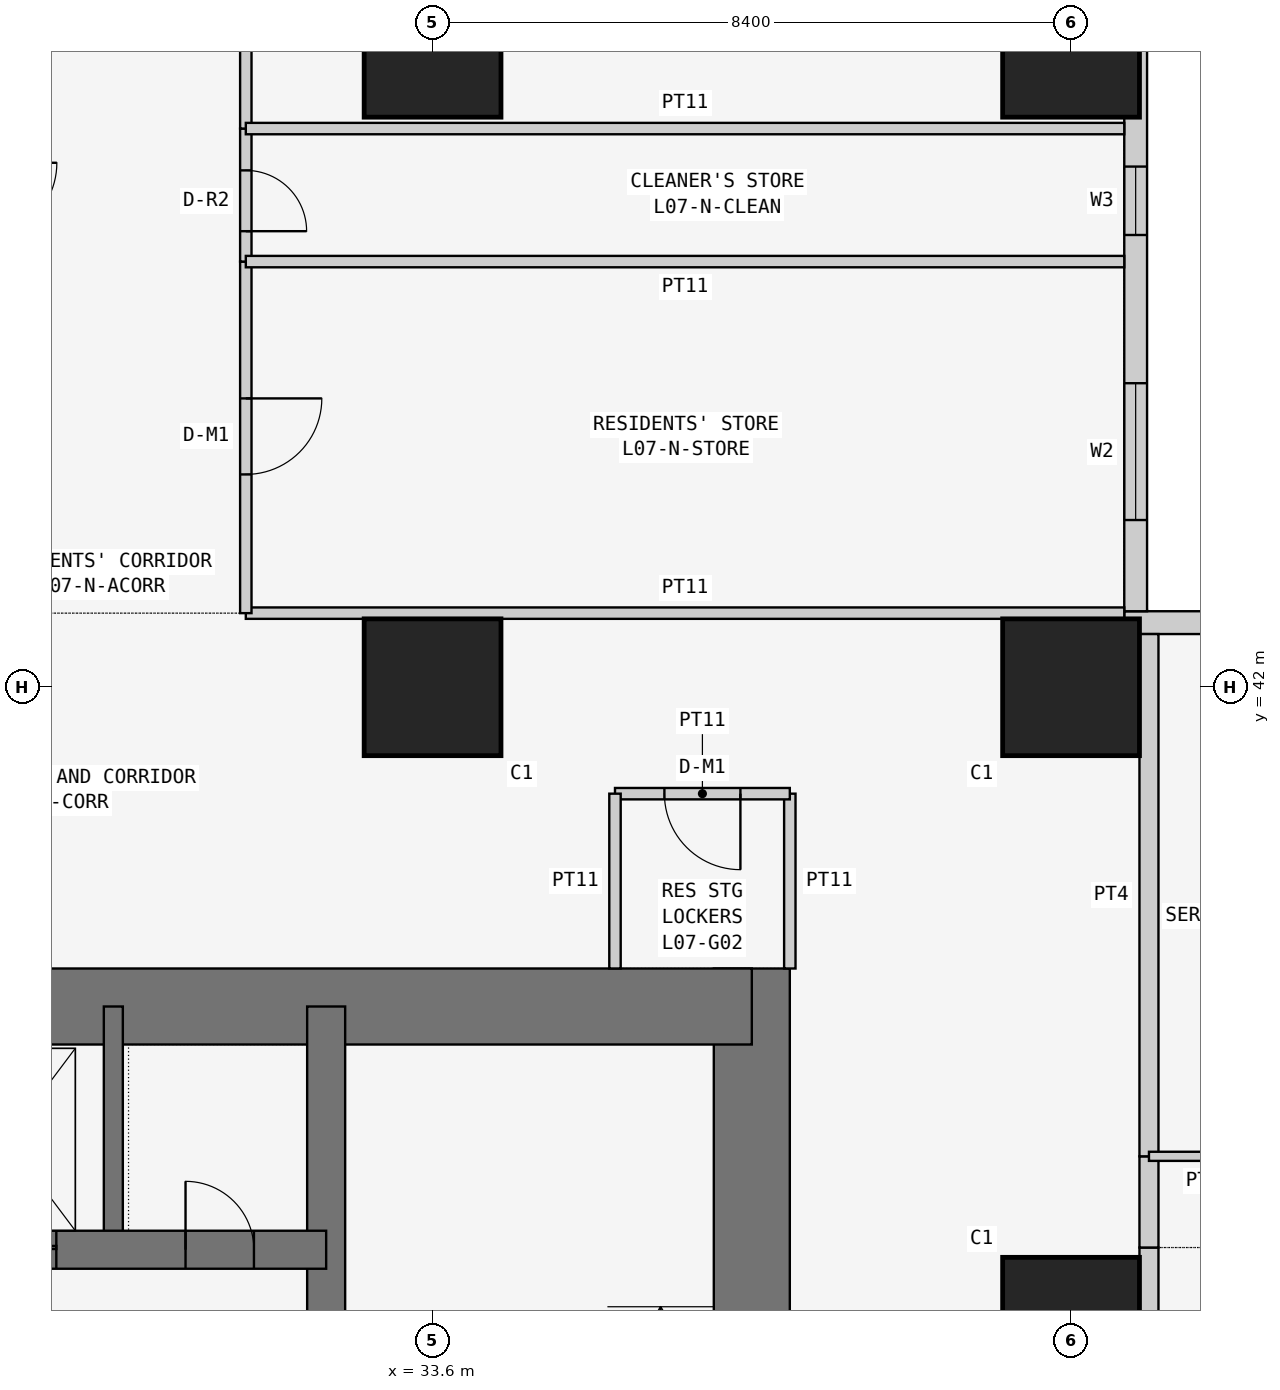
"""IFC4 building model, lengths in metres.
Left out: names, types, materials, properties, quantities, classifications, styles, units other than length and angle.
Written with IfcOpenShell. Run it as: python <this file> out.ifc"""

import sys

from ifc_helpers import new_model, si_unit, direction, frame, frame_2d, origin, origin_2d, place, context, subcontext, project, spatial, rectangle, extrude, element, fill, save


model = new_model("IFC4")
c1 = context("Model", 3, precision=1e-05, world=origin(), true_north=direction((0.0, 1.0)))
c2 = subcontext(c1, "Body", "Model", "MODEL_VIEW")
j1 = project(units=[si_unit("LENGTHUNIT", "METRE"), si_unit("PLANEANGLEUNIT", "RADIAN")], contexts=[c1])
p1 = place(None, origin())
s1 = spatial("IfcSite", under=j1, at=p1, CompositionType="ELEMENT")
p2 = place(p1, origin())
s2 = spatial("IfcBuilding", under=s1, at=p2, CompositionType="ELEMENT")
p3 = place(p2, frame((0.0, 0.0, 34.5)))
s3 = spatial("IfcBuildingStorey", under=s2, at=p3, CompositionType="ELEMENT", Elevation=34.5)
for number, where, z_axis, x_axis in (
    (1, (33.6, 42.0, 0.0), (0.0, 0.0, 1.0), (1.0, 0.0, 0.0)),
    (2, (33.6, 50.4, 0.0), (0.0, 0.0, 1.0), (1.0, 0.0, 0.0)),
    (3, (42.0, 33.6, 0.0), (0.0, 0.0, 1.0), (1.0, 0.0, 0.0)),
    (4, (42.0, 42.0, 0.0), (0.0, 0.0, 1.0), (1.0, 0.0, 0.0)),
    (5, (42.0, 50.4, 0.0), (0.0, 0.0, 1.0), (1.0, 0.0, 0.0)),
):
    element("IfcColumn", number, at=place(p3, frame(where, z_axis=z_axis, x_axis=x_axis)), inside=s3, PredefinedType="COLUMN", context=c2, shape_type="SweptSolid", body=[
        extrude(rectangle(XDim=1.8, YDim=1.8, at=origin_2d()), origin(), (0.0, 0.0, 1.0), 3.6),
    ])
p4 = place(p3, frame((37.8, 21.0, 0.0), z_axis=(0.0, 0.0, 1.0), x_axis=(0.0, 1.0, 0.0)))
e6 = element("IfcWall", 6, at=p4, inside=s3, PredefinedType="SHEAR", context=c2, shape_type="SweptSolid", body=[
    extrude(rectangle(XDim=17.3, YDim=1.0, at=frame_2d((8.65, 0.0))), origin(), (0.0, 0.0, 1.0), 3.6),
])
p5 = place(p4, frame((5.2, 0.0, 0.0)))
e7 = element("IfcOpeningElement", 7, at=p5, cuts=e6, PredefinedType="OPENING", context=c2, shape_type="SweptSolid", body=[
    extrude(rectangle(XDim=1.2, YDim=2.1, at=frame_2d((0.6, 1.05))), frame((0.0, 0.51, 0.0), z_axis=(0.0, -1.0, 0.0), x_axis=(1.0, 0.0, 0.0)), (0.0, 0.0, 1.0), 1.02),
])
p6 = place(p3, frame((37.8, 37.8, 0.0), z_axis=(0.0, 0.0, 1.0), x_axis=(-1.0, 0.0, 0.0)))
e8 = element("IfcWall", 8, at=p6, inside=s3, PredefinedType="SHEAR", context=c2, shape_type="SweptSolid", body=[
    extrude(rectangle(XDim=17.3, YDim=1.0, at=frame_2d((8.65, 0.0))), origin(), (0.0, 0.0, 1.0), 3.6),
])
p7 = place(p3, frame((21.0, 34.6, 0.0), z_axis=(0.0, 0.0, 1.0), x_axis=(1.0, 0.0, 0.0)))
e9 = element("IfcWall", 9, at=p7, inside=s3, PredefinedType="SHEAR", context=c2, shape_type="SweptSolid", body=[
    extrude(rectangle(XDim=11.2, YDim=0.5, at=frame_2d((5.6, 0.0))), origin(), (0.0, 0.0, 1.0), 3.6),
])
p8 = place(p7, frame((9.35, 0.0, 0.0)))
e10 = element("IfcOpeningElement", 10, at=p8, cuts=e9, PredefinedType="OPENING", context=c2, shape_type="SweptSolid", body=[
    extrude(rectangle(XDim=0.9, YDim=2.1, at=frame_2d((0.45, 1.05))), frame((0.0, 0.26, 0.0), z_axis=(0.0, -1.0, 0.0), x_axis=(1.0, 0.0, 0.0)), (0.0, 0.0, 1.0), 0.52),
])
p9 = place(p7, frame((1.0, 0.0, 0.0)))
e11 = element("IfcOpeningElement", 11, at=p9, cuts=e9, PredefinedType="OPENING", context=c2, shape_type="SweptSolid", body=[
    extrude(rectangle(XDim=1.1, YDim=2.1, at=frame_2d((0.55, 1.05))), frame((0.0, 0.26, 0.0), z_axis=(0.0, -1.0, 0.0), x_axis=(1.0, 0.0, 0.0)), (0.0, 0.0, 1.0), 0.52),
])
p10 = place(p7, frame((3.65, 0.0, 0.0)))
e12 = element("IfcOpeningElement", 12, at=p10, cuts=e9, PredefinedType="OPENING", context=c2, shape_type="SweptSolid", body=[
    extrude(rectangle(XDim=1.1, YDim=2.1, at=frame_2d((0.55, 1.05))), frame((0.0, 0.26, 0.0), z_axis=(0.0, -1.0, 0.0), x_axis=(1.0, 0.0, 0.0)), (0.0, 0.0, 1.0), 0.52),
])
p11 = place(p7, frame((6.35, 0.0, 0.0)))
e13 = element("IfcOpeningElement", 13, at=p11, cuts=e9, PredefinedType="OPENING", context=c2, shape_type="SweptSolid", body=[
    extrude(rectangle(XDim=1.3, YDim=2.1, at=frame_2d((0.65, 1.05))), frame((0.0, 0.26, 0.0), z_axis=(0.0, -1.0, 0.0), x_axis=(1.0, 0.0, 0.0)), (0.0, 0.0, 1.0), 0.52),
])
p12 = place(p3, frame((32.2, 29.15, 0.0), z_axis=(0.0, 0.0, 1.0), x_axis=(0.0, 1.0, 0.0)))
e14 = element("IfcWall", 14, at=p12, inside=s3, PredefinedType="SHEAR", context=c2, shape_type="SweptSolid", body=[
    extrude(rectangle(XDim=8.65, YDim=0.5, at=frame_2d((4.325, 0.0))), origin(), (0.0, 0.0, 1.0), 3.6),
])
p13 = place(p3, frame((29.4, 34.6, 0.0), z_axis=(0.0, 0.0, 1.0), x_axis=(0.0, 1.0, 0.0)))
e15 = element("IfcWall", 15, at=p13, inside=s3, PredefinedType="SHEAR", context=c2, shape_type="SweptSolid", body=[
    extrude(rectangle(XDim=3.2, YDim=0.25, at=frame_2d((1.6, 0.0))), origin(), (0.0, 0.0, 1.0), 3.6),
])
p14 = place(p3, frame((58.4, 42.85, 0.0), z_axis=(0.0, 0.0, 1.0), x_axis=(-1.0, 0.0, 0.0)))
e16 = element("IfcWall", 16, at=p14, inside=s3, PredefinedType="SOLIDWALL", context=c2, shape_type="SweptSolid", body=[
    extrude(rectangle(XDim=15.7, YDim=0.3, at=frame_2d((7.85, 0.0))), origin(), (0.0, 0.0, 1.0), 3.45),
])
p15 = place(p14, frame((12.4, 0.0, 0.9)))
e17 = element("IfcOpeningElement", 17, at=p15, cuts=e16, PredefinedType="OPENING", context=c2, shape_type="SweptSolid", body=[
    extrude(rectangle(XDim=1.8, YDim=1.5, at=frame_2d((0.9, 0.75))), frame((0.0, 0.16, 0.0), z_axis=(0.0, -1.0, 0.0), x_axis=(1.0, 0.0, 0.0)), (0.0, 0.0, 1.0), 0.32),
])
p16 = place(p14, frame((9.55, 0.0, 1.5)))
e18 = element("IfcOpeningElement", 18, at=p16, cuts=e16, PredefinedType="OPENING", context=c2, shape_type="SweptSolid", body=[
    extrude(rectangle(XDim=0.9, YDim=0.7, at=frame_2d((0.45, 0.35))), frame((0.0, 0.16, 0.0), z_axis=(0.0, -1.0, 0.0), x_axis=(1.0, 0.0, 0.0)), (0.0, 0.0, 1.0), 0.32),
])
p17 = place(p14, frame((5.1, 0.0, 0.9)))
e19 = element("IfcOpeningElement", 19, at=p17, cuts=e16, PredefinedType="OPENING", context=c2, shape_type="SweptSolid", body=[
    extrude(rectangle(XDim=1.8, YDim=1.5, at=frame_2d((0.9, 0.75))), frame((0.0, 0.16, 0.0), z_axis=(0.0, -1.0, 0.0), x_axis=(1.0, 0.0, 0.0)), (0.0, 0.0, 1.0), 0.32),
])
p18 = place(p14, frame((2.0, 0.0, 0.0)))
e20 = element("IfcOpeningElement", 20, at=p18, cuts=e16, PredefinedType="OPENING", context=c2, shape_type="SweptSolid", body=[
    extrude(rectangle(XDim=0.9, YDim=2.4, at=frame_2d((0.45, 1.2))), frame((0.0, 0.16, 0.0), z_axis=(0.0, -1.0, 0.0), x_axis=(1.0, 0.0, 0.0)), (0.0, 0.0, 1.0), 0.32),
])
p19 = place(p14, frame((0.7, 0.0, 0.9)))
e21 = element("IfcOpeningElement", 21, at=p19, cuts=e16, PredefinedType="OPENING", context=c2, shape_type="SweptSolid", body=[
    extrude(rectangle(XDim=1.2, YDim=1.5, at=frame_2d((0.6, 0.75))), frame((0.0, 0.16, 0.0), z_axis=(0.0, -1.0, 0.0), x_axis=(1.0, 0.0, 0.0)), (0.0, 0.0, 1.0), 0.32),
])
p20 = place(p3, frame((42.85, 43.0, 0.0), z_axis=(0.0, 0.0, 1.0), x_axis=(0.0, 1.0, 0.0)))
e22 = element("IfcWall", 22, at=p20, inside=s3, PredefinedType="SOLIDWALL", context=c2, shape_type="SweptSolid", body=[
    extrude(rectangle(XDim=15.4, YDim=0.3, at=frame_2d((7.7, 0.0))), origin(), (0.0, 0.0, 1.0), 3.45),
])
p21 = place(p20, frame((1.2, 0.0, 0.9)))
e23 = element("IfcOpeningElement", 23, at=p21, cuts=e22, PredefinedType="OPENING", context=c2, shape_type="SweptSolid", body=[
    extrude(rectangle(XDim=1.8, YDim=1.5, at=frame_2d((0.9, 0.75))), frame((0.0, 0.16, 0.0), z_axis=(0.0, -1.0, 0.0), x_axis=(1.0, 0.0, 0.0)), (0.0, 0.0, 1.0), 0.32),
])
p22 = place(p20, frame((4.95, 0.0, 1.5)))
e24 = element("IfcOpeningElement", 24, at=p22, cuts=e22, PredefinedType="OPENING", context=c2, shape_type="SweptSolid", body=[
    extrude(rectangle(XDim=0.9, YDim=0.7, at=frame_2d((0.45, 0.35))), frame((0.0, 0.16, 0.0), z_axis=(0.0, -1.0, 0.0), x_axis=(1.0, 0.0, 0.0)), (0.0, 0.0, 1.0), 0.32),
])
p23 = place(p20, frame((8.5, 0.0, 0.9)))
e25 = element("IfcOpeningElement", 25, at=p23, cuts=e22, PredefinedType="OPENING", context=c2, shape_type="SweptSolid", body=[
    extrude(rectangle(XDim=1.8, YDim=1.5, at=frame_2d((0.9, 0.75))), frame((0.0, 0.16, 0.0), z_axis=(0.0, -1.0, 0.0), x_axis=(1.0, 0.0, 0.0)), (0.0, 0.0, 1.0), 0.32),
])
p24 = place(p20, frame((12.5, 0.0, 0.0)))
e26 = element("IfcOpeningElement", 26, at=p24, cuts=e22, PredefinedType="OPENING", context=c2, shape_type="SweptSolid", body=[
    extrude(rectangle(XDim=0.9, YDim=2.4, at=frame_2d((0.45, 1.2))), frame((0.0, 0.16, 0.0), z_axis=(0.0, -1.0, 0.0), x_axis=(1.0, 0.0, 0.0)), (0.0, 0.0, 1.0), 0.32),
])
p25 = place(p20, frame((13.5, 0.0, 0.9)))
e27 = element("IfcOpeningElement", 27, at=p25, cuts=e22, PredefinedType="OPENING", context=c2, shape_type="SweptSolid", body=[
    extrude(rectangle(XDim=1.2, YDim=1.5, at=frame_2d((0.6, 0.75))), frame((0.0, 0.16, 0.0), z_axis=(0.0, -1.0, 0.0), x_axis=(1.0, 0.0, 0.0)), (0.0, 0.0, 1.0), 0.32),
])
p26 = place(p3, frame((38.3, 38.3, 0.0), z_axis=(0.0, 0.0, 1.0), x_axis=(0.0, 1.0, 0.0)))
e28 = element("IfcWall", 28, at=p26, inside=s3, PredefinedType="PARTITIONING", context=c2, shape_type="SweptSolid", body=[
    extrude(rectangle(XDim=2.3, YDim=0.15, at=frame_2d((1.15, 0.0))), origin(), (0.0, 0.0, 1.0), 3.45),
])
p27 = place(p3, frame((38.3, 40.6, 0.0), z_axis=(0.0, 0.0, 1.0), x_axis=(-1.0, 0.0, 0.0)))
e29 = element("IfcWall", 29, at=p27, inside=s3, PredefinedType="PARTITIONING", context=c2, shape_type="SweptSolid", body=[
    extrude(rectangle(XDim=2.3, YDim=0.15, at=frame_2d((1.15, 0.0))), origin(), (0.0, 0.0, 1.0), 3.45),
])
p28 = place(p27, frame((0.65, 0.0, 0.0)))
e30 = element("IfcOpeningElement", 30, at=p28, cuts=e29, PredefinedType="OPENING", context=c2, shape_type="SweptSolid", body=[
    extrude(rectangle(XDim=1.0, YDim=2.1, at=frame_2d((0.5, 1.05))), frame((0.0, 0.085, 0.0), z_axis=(0.0, -1.0, 0.0), x_axis=(1.0, 0.0, 0.0)), (0.0, 0.0, 1.0), 0.17),
])
p29 = place(p3, frame((36.0, 40.6, 0.0), z_axis=(0.0, 0.0, 1.0), x_axis=(0.0, -1.0, 0.0)))
e31 = element("IfcWall", 31, at=p29, inside=s3, PredefinedType="PARTITIONING", context=c2, shape_type="SweptSolid", body=[
    extrude(rectangle(XDim=2.3, YDim=0.15, at=frame_2d((1.15, 0.0))), origin(), (0.0, 0.0, 1.0), 3.45),
])
p30 = place(p3, frame((31.143, 42.975, 0.0), z_axis=(0.0, 0.0, 1.0), x_axis=(1.0, 0.0, 0.0)))
e32 = element("IfcWall", 32, at=p30, inside=s3, PredefinedType="PARTITIONING", context=c2, shape_type="SweptSolid", body=[
    extrude(rectangle(XDim=11.557, YDim=0.15, at=frame_2d((5.778, 0.0))), origin(), (0.0, 0.0, 1.0), 3.45),
])
p31 = place(p3, frame((43.025, 34.629, 0.0), z_axis=(0.0, 0.0, 1.0), x_axis=(0.0, -1.0, 0.0)))
e33 = element("IfcWall", 33, at=p31, inside=s3, PredefinedType="PARTITIONING", context=c2, shape_type="SweptSolid", body=[
    extrude(rectangle(XDim=5.229, YDim=0.25, at=frame_2d((2.615, 0.0))), origin(), (0.0, 0.0, 1.0), 3.45),
])
p32 = place(p31, frame((2.129, 0.0, 0.0)))
e34 = element("IfcOpeningElement", 34, at=p32, cuts=e33, PredefinedType="OPENING", context=c2, shape_type="SweptSolid", body=[
    extrude(rectangle(XDim=1.0, YDim=2.1, at=frame_2d((0.5, 1.05))), frame((0.0, 0.135, 0.0), z_axis=(0.0, -1.0, 0.0), x_axis=(1.0, 0.0, 0.0)), (0.0, 0.0, 1.0), 0.27),
])
p33 = place(p3, frame((43.025, 35.829, 0.0), z_axis=(0.0, 0.0, 1.0), x_axis=(0.0, -1.0, 0.0)))
e35 = element("IfcWall", 35, at=p33, inside=s3, PredefinedType="PARTITIONING", context=c2, shape_type="SweptSolid", body=[
    extrude(rectangle(XDim=1.2, YDim=0.25, at=frame_2d((0.6, 0.0))), origin(), (0.0, 0.0, 1.0), 3.45),
])
p34 = place(p3, frame((43.025, 42.7, 0.0), z_axis=(0.0, 0.0, 1.0), x_axis=(0.0, -1.0, 0.0)))
e36 = element("IfcWall", 36, at=p34, inside=s3, PredefinedType="PARTITIONING", context=c2, shape_type="SweptSolid", body=[
    extrude(rectangle(XDim=6.871, YDim=0.25, at=frame_2d((3.436, 0.0))), origin(), (0.0, 0.0, 1.0), 3.45),
])
p35 = place(p3, frame((31.143, 42.975, 0.0), z_axis=(0.0, 0.0, 1.0), x_axis=(0.0, 1.0, 0.0)))
e37 = element("IfcWall", 37, at=p35, inside=s3, PredefinedType="PARTITIONING", context=c2, shape_type="SweptSolid", body=[
    extrude(rectangle(XDim=4.625, YDim=0.15, at=frame_2d((2.312, 0.0))), origin(), (0.0, 0.0, 1.0), 3.45),
])
p36 = place(p35, frame((1.825, 0.0, 0.0)))
e38 = element("IfcOpeningElement", 38, at=p36, cuts=e37, PredefinedType="OPENING", context=c2, shape_type="SweptSolid", body=[
    extrude(rectangle(XDim=1.0, YDim=2.1, at=frame_2d((0.5, 1.05))), frame((0.0, 0.085, 0.0), z_axis=(0.0, -1.0, 0.0), x_axis=(1.0, 0.0, 0.0)), (0.0, 0.0, 1.0), 0.17),
])
p37 = place(p3, frame((31.143, 47.6, 0.0), z_axis=(0.0, 0.0, 1.0), x_axis=(0.0, 1.0, 0.0)))
e39 = element("IfcWall", 39, at=p37, inside=s3, PredefinedType="PARTITIONING", context=c2, shape_type="SweptSolid", body=[
    extrude(rectangle(XDim=1.75, YDim=0.15, at=frame_2d((0.875, 0.0))), origin(), (0.0, 0.0, 1.0), 3.45),
])
p38 = place(p37, frame((0.4, 0.0, 0.0)))
e40 = element("IfcOpeningElement", 40, at=p38, cuts=e39, PredefinedType="OPENING", context=c2, shape_type="SweptSolid", body=[
    extrude(rectangle(XDim=0.8, YDim=2.1, at=frame_2d((0.4, 1.05))), frame((0.0, 0.085, 0.0), z_axis=(0.0, -1.0, 0.0), x_axis=(1.0, 0.0, 0.0)), (0.0, 0.0, 1.0), 0.17),
])
p39 = place(p3, frame((31.143, 49.35, 0.0), z_axis=(0.0, 0.0, 1.0), x_axis=(0.0, 1.0, 0.0)))
e41 = element("IfcWall", 41, at=p39, inside=s3, PredefinedType="PARTITIONING", context=c2, shape_type="SweptSolid", body=[
    extrude(rectangle(XDim=4.25, YDim=0.15, at=frame_2d((2.125, 0.0))), origin(), (0.0, 0.0, 1.0), 3.45),
])
p40 = place(p39, frame((1.55, 0.0, 0.0)))
e42 = element("IfcOpeningElement", 42, at=p40, cuts=e41, PredefinedType="OPENING", context=c2, shape_type="SweptSolid", body=[
    extrude(rectangle(XDim=1.0, YDim=2.1, at=frame_2d((0.5, 1.05))), frame((0.0, 0.085, 0.0), z_axis=(0.0, -1.0, 0.0), x_axis=(1.0, 0.0, 0.0)), (0.0, 0.0, 1.0), 0.17),
])
for number, where, z_axis, x_axis in (
    (43, (42.7, 47.6, 0.0), (0.0, 0.0, 1.0), (-1.0, 0.0, 0.0)),
    (44, (42.7, 49.35, 0.0), (0.0, 0.0, 1.0), (-1.0, 0.0, 0.0)),
):
    element("IfcWall", number, at=place(p3, frame(where, z_axis=z_axis, x_axis=x_axis)), inside=s3, PredefinedType="PARTITIONING", context=c2, shape_type="SweptSolid", body=[
        extrude(rectangle(XDim=11.557, YDim=0.15, at=frame_2d((5.778, 0.0))), origin(), (0.0, 0.0, 1.0), 3.45),
    ])
p41 = place(p3, frame((46.6, 35.829, 0.0), z_axis=(0.0, 0.0, 1.0), x_axis=(-1.0, 0.0, 0.0)))
e45 = element("IfcWall", 45, at=p41, inside=s3, PredefinedType="PARTITIONING", context=c2, shape_type="SweptSolid", body=[
    extrude(rectangle(XDim=3.575, YDim=0.12, at=frame_2d((1.788, 0.0))), origin(), (0.0, 0.0, 1.0), 3.45),
])
p42 = place(p41, frame((1.35, 0.0, 0.0)))
e46 = element("IfcOpeningElement", 46, at=p42, cuts=e45, PredefinedType="OPENING", context=c2, shape_type="SweptSolid", body=[
    extrude(rectangle(XDim=0.9, YDim=2.1, at=frame_2d((0.45, 1.05))), frame((0.0, 0.07, 0.0), z_axis=(0.0, -1.0, 0.0), x_axis=(1.0, 0.0, 0.0)), (0.0, 0.0, 1.0), 0.14),
])
p43 = place(p21, origin())
e47 = element("IfcWindow", 47, at=p43, inside=s3, PartitioningType="SINGLE_PANEL", PredefinedType="WINDOW", context=c2, shape_type="SweptSolid", body=[
    extrude(rectangle(XDim=1.8, YDim=1.5, at=frame_2d((0.9, 0.75))), frame((0.0, 0.03, 0.0), z_axis=(0.0, -1.0, 0.0), x_axis=(1.0, 0.0, 0.0)), (0.0, 0.0, 1.0), 0.06),
])
fill(e23, e47)
p44 = place(p22, origin())
e48 = element("IfcWindow", 48, at=p44, inside=s3, PartitioningType="SINGLE_PANEL", PredefinedType="WINDOW", context=c2, shape_type="SweptSolid", body=[
    extrude(rectangle(XDim=0.9, YDim=0.7, at=frame_2d((0.45, 0.35))), frame((0.0, 0.03, 0.0), z_axis=(0.0, -1.0, 0.0), x_axis=(1.0, 0.0, 0.0)), (0.0, 0.0, 1.0), 0.06),
])
fill(e24, e48)
p45 = place(p28, origin())
e49 = element("IfcDoor", 49, at=p45, inside=s3, OperationType="SINGLE_SWING_LEFT", PredefinedType="DOOR", context=c2, shape_type="SweptSolid", body=[
    extrude(rectangle(XDim=1.0, YDim=2.1, at=frame_2d((0.5, 1.05))), frame((0.0, 0.025, 0.0), z_axis=(0.0, -1.0, 0.0), x_axis=(1.0, 0.0, 0.0)), (0.0, 0.0, 1.0), 0.05),
])
fill(e30, e49)
p46 = place(p36, frame((1.0, 0.0, 0.0), z_axis=(0.0, 0.0, 1.0), x_axis=(-1.0, 0.0, 0.0)))
e50 = element("IfcDoor", 50, at=p46, inside=s3, OperationType="SINGLE_SWING_LEFT", PredefinedType="DOOR", context=c2, shape_type="SweptSolid", body=[
    extrude(rectangle(XDim=1.0, YDim=2.1, at=frame_2d((0.5, 1.05))), frame((0.0, 0.025, 0.0), z_axis=(0.0, -1.0, 0.0), x_axis=(1.0, 0.0, 0.0)), (0.0, 0.0, 1.0), 0.05),
])
fill(e38, e50)
p47 = place(p38, frame((0.8, 0.0, 0.0), z_axis=(0.0, 0.0, 1.0), x_axis=(-1.0, 0.0, 0.0)))
e51 = element("IfcDoor", 51, at=p47, inside=s3, OperationType="SINGLE_SWING_RIGHT", PredefinedType="DOOR", context=c2, shape_type="SweptSolid", body=[
    extrude(rectangle(XDim=0.8, YDim=2.1, at=frame_2d((0.4, 1.05))), frame((0.0, 0.025, 0.0), z_axis=(0.0, -1.0, 0.0), x_axis=(1.0, 0.0, 0.0)), (0.0, 0.0, 1.0), 0.05),
])
fill(e40, e51)
p48 = place(p8, origin())
e52 = element("IfcDoor", 52, at=p48, inside=s3, OperationType="SINGLE_SWING_LEFT", PredefinedType="DOOR", context=c2, shape_type="SweptSolid", body=[
    extrude(rectangle(XDim=0.9, YDim=2.1, at=frame_2d((0.45, 1.05))), frame((0.0, 0.025, 0.0), z_axis=(0.0, -1.0, 0.0), x_axis=(1.0, 0.0, 0.0)), (0.0, 0.0, 1.0), 0.05),
])
fill(e10, e52)
p49 = place(p11, origin())
e53 = element("IfcDoor", 53, at=p49, inside=s3, OperationType="DOUBLE_DOOR_SLIDING", PredefinedType="DOOR", context=c2, shape_type="SweptSolid", body=[
    extrude(rectangle(XDim=1.3, YDim=2.1, at=frame_2d((0.65, 1.05))), frame((0.0, 0.025, 0.0), z_axis=(0.0, -1.0, 0.0), x_axis=(1.0, 0.0, 0.0)), (0.0, 0.0, 1.0), 0.05),
])
fill(e13, e53)
save(model, sys.argv[1])
